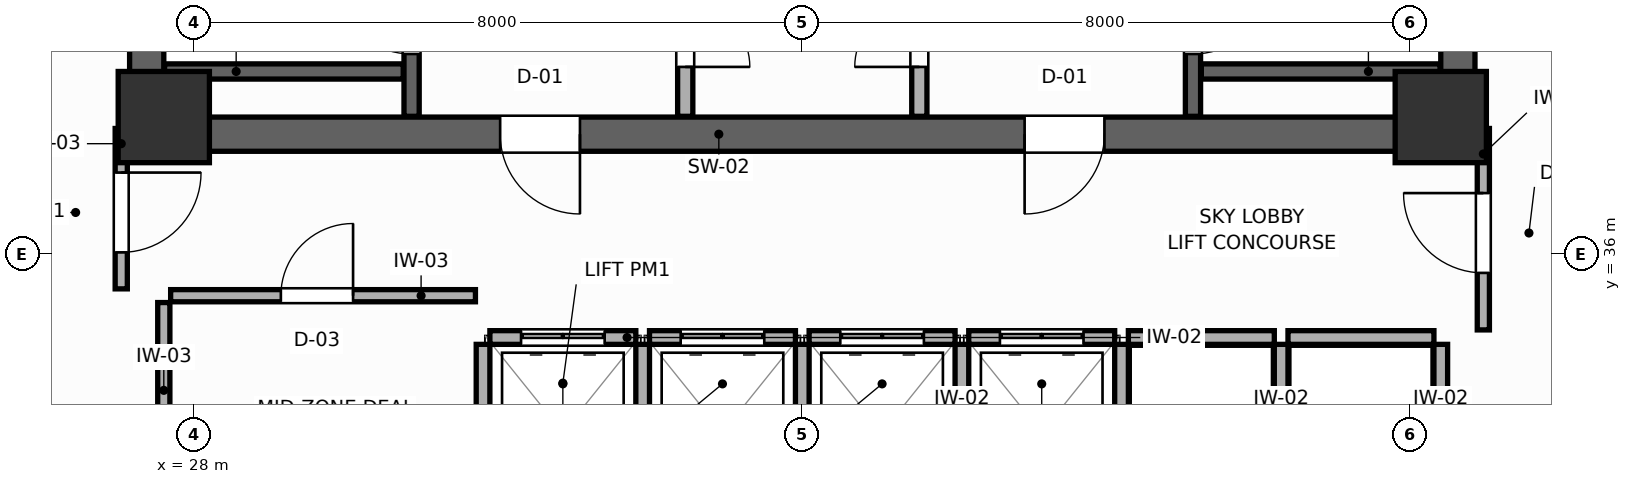
"""IFC4 building model, lengths in metres.
Left out: names, types, materials, properties, quantities, classifications, styles, units other than length and angle.
Written with IfcOpenShell. Run it as: python <this file> out.ifc"""

import sys

from ifc_helpers import new_model, si_unit, direction, frame, frame_2d, origin, origin_2d, place, context, subcontext, project, spatial, rectangle, extrude, source, transform, mapped, element, fill, save


model = new_model("IFC4")
c1 = context("Model", 3, precision=1e-05, world=origin(), true_north=direction((0.0, 1.0)))
c2 = subcontext(c1, "Body", "Model", "MODEL_VIEW")
j1 = project(units=[si_unit("LENGTHUNIT", "METRE"), si_unit("PLANEANGLEUNIT", "RADIAN")], contexts=[c1])
p1 = place(None, origin())
s1 = spatial("IfcSite", under=j1, at=p1, CompositionType="ELEMENT")
p2 = place(p1, origin())
s2 = spatial("IfcBuilding", under=s1, at=p2, CompositionType="ELEMENT")
p3 = place(p2, frame((0.0, 0.0, 168.6)))
s3 = spatial("IfcBuildingStorey", under=s2, at=p3, CompositionType="ELEMENT", Elevation=168.6)
p4 = place(p3, frame((27.15, 37.575, 0.0), z_axis=(0.0, 0.0, 1.0), x_axis=(1.0, 0.0, 0.0)))
e1 = element("IfcWall", 1, at=p4, inside=s3, PredefinedType="SHEAR", context=c2, shape_type="SweptSolid", body=[
    extrude(rectangle(XDim=17.7, YDim=0.45, at=frame_2d((8.85, 0.0))), origin(), (0.0, 0.0, 1.0), 3.6),
])
p5 = place(p4, frame((4.875, 0.0, 0.0)))
e2 = element("IfcOpeningElement", 2, at=p5, cuts=e1, PredefinedType="OPENING", context=c2, shape_type="SweptSolid", body=[
    extrude(rectangle(XDim=1.05, YDim=2.1, at=frame_2d((0.525, 1.05))), frame((0.0, 0.235, 0.0), z_axis=(0.0, -1.0, 0.0), x_axis=(1.0, 0.0, 0.0)), (0.0, 0.0, 1.0), 0.47),
])
p6 = place(p4, frame((11.775, 0.0, 0.0)))
e3 = element("IfcOpeningElement", 3, at=p6, cuts=e1, PredefinedType="OPENING", context=c2, shape_type="SweptSolid", body=[
    extrude(rectangle(XDim=1.05, YDim=2.1, at=frame_2d((0.525, 1.05))), frame((0.0, 0.235, 0.0), z_axis=(0.0, -1.0, 0.0), x_axis=(1.0, 0.0, 0.0)), (0.0, 0.0, 1.0), 0.47),
])
for number, where, z_axis, x_axis in (
    (4, (27.375, 37.8, 0.0), (0.0, 0.0, 1.0), (0.0, 1.0, 0.0)),
    (5, (44.625, 37.8, 0.0), (0.0, 0.0, 1.0), (0.0, 1.0, 0.0)),
):
    element("IfcWall", number, at=place(p3, frame(where, z_axis=z_axis, x_axis=x_axis)), inside=s3, PredefinedType="SHEAR", context=c2, shape_type="SweptSolid", body=[
        extrude(rectangle(XDim=9.0, YDim=0.45, at=frame_2d((4.5, 0.0))), origin(), (0.0, 0.0, 1.0), 3.6),
    ])
m1 = source(origin(), c2, "Body", "SweptSolid", [
    extrude(rectangle(XDim=1.2, YDim=1.2, at=origin_2d()), origin(), (0.0, 0.0, 1.0), 3.6),
])
for number, where, z_axis, x_axis in (
    (6, (27.6, 37.8, 0.0), (0.0, 0.0, 1.0), (1.0, 0.0, 0.0)),
    (7, (44.4, 37.8, 0.0), (0.0, 0.0, 1.0), (1.0, 0.0, 0.0)),
):
    element("IfcColumn", number, at=place(p3, frame(where, z_axis=z_axis, x_axis=x_axis)), inside=s3, PredefinedType="COLUMN", context=c2, shape_type="MappedRepresentation", body=[
        mapped(m1, transform((0.0, 0.0, 0.0), scale=1.0)),
    ])
p7 = place(p3, frame((30.86, 37.81, 0.0), z_axis=(0.0, 0.0, 1.0), x_axis=(0.0, 1.0, 0.0)))
e8 = element("IfcWall", 8, at=p7, inside=s3, PredefinedType="SHEAR", context=c2, shape_type="SweptSolid", body=[
    extrude(rectangle(XDim=8.98, YDim=0.2, at=frame_2d((4.49, 0.0))), origin(), (0.0, 0.0, 1.0), 3.6),
])
p8 = place(p7, frame((0.82, 0.0, 0.0)))
e9 = element("IfcOpeningElement", 9, at=p8, cuts=e8, PredefinedType="OPENING", context=c2, shape_type="SweptSolid", body=[
    extrude(rectangle(XDim=1.05, YDim=2.1, at=frame_2d((0.525, 1.05))), frame((0.0, 0.11, 0.0), z_axis=(0.0, -1.0, 0.0), x_axis=(1.0, 0.0, 0.0)), (0.0, 0.0, 1.0), 0.22),
])
p9 = place(p3, frame((27.61, 38.4, 0.0), z_axis=(0.0, 0.0, 1.0), x_axis=(1.0, 0.0, 0.0)))
e10 = element("IfcWall", 10, at=p9, inside=s3, PredefinedType="SHEAR", context=c2, shape_type="SweptSolid", body=[
    extrude(rectangle(XDim=3.14, YDim=0.2, at=frame_2d((1.57, 0.0))), origin(), (0.0, 0.0, 1.0), 3.6),
])
p10 = place(p3, frame((41.14, 37.81, 0.0), z_axis=(0.0, 0.0, 1.0), x_axis=(0.0, 1.0, 0.0)))
e11 = element("IfcWall", 11, at=p10, inside=s3, PredefinedType="SHEAR", context=c2, shape_type="SweptSolid", body=[
    extrude(rectangle(XDim=8.98, YDim=0.2, at=frame_2d((4.49, 0.0))), origin(), (0.0, 0.0, 1.0), 3.6),
])
p11 = place(p10, frame((0.82, 0.0, 0.0)))
e12 = element("IfcOpeningElement", 12, at=p11, cuts=e11, PredefinedType="OPENING", context=c2, shape_type="SweptSolid", body=[
    extrude(rectangle(XDim=1.05, YDim=2.1, at=frame_2d((0.525, 1.05))), frame((0.0, 0.11, 0.0), z_axis=(0.0, -1.0, 0.0), x_axis=(1.0, 0.0, 0.0)), (0.0, 0.0, 1.0), 0.22),
])
p12 = place(p3, frame((41.25, 38.4, 0.0), z_axis=(0.0, 0.0, 1.0), x_axis=(1.0, 0.0, 0.0)))
e13 = element("IfcWall", 13, at=p12, inside=s3, PredefinedType="SHEAR", context=c2, shape_type="SweptSolid", body=[
    extrude(rectangle(XDim=3.14, YDim=0.2, at=frame_2d((1.57, 0.0))), origin(), (0.0, 0.0, 1.0), 3.6),
])
p13 = place(p3, frame((34.46, 37.81, 0.0), z_axis=(0.0, 0.0, 1.0), x_axis=(0.0, 1.0, 0.0)))
e14 = element("IfcWall", 14, at=p13, inside=s3, PredefinedType="PARTITIONING", context=c2, shape_type="SweptSolid", body=[
    extrude(rectangle(XDim=8.98, YDim=0.2, at=frame_2d((4.49, 0.0))), origin(), (0.0, 0.0, 1.0), 3.4),
])
p14 = place(p13, frame((0.65, 0.0, 0.0)))
e15 = element("IfcOpeningElement", 15, at=p14, cuts=e14, PredefinedType="OPENING", context=c2, shape_type="SweptSolid", body=[
    extrude(rectangle(XDim=0.85, YDim=2.05, at=frame_2d((0.425, 1.025))), frame((0.0, 0.11, 0.0), z_axis=(0.0, -1.0, 0.0), x_axis=(1.0, 0.0, 0.0)), (0.0, 0.0, 1.0), 0.22),
])
p15 = place(p3, frame((37.54, 37.81, 0.0), z_axis=(0.0, 0.0, 1.0), x_axis=(0.0, 1.0, 0.0)))
e16 = element("IfcWall", 16, at=p15, inside=s3, PredefinedType="PARTITIONING", context=c2, shape_type="SweptSolid", body=[
    extrude(rectangle(XDim=8.98, YDim=0.2, at=frame_2d((4.49, 0.0))), origin(), (0.0, 0.0, 1.0), 3.4),
])
p16 = place(p15, frame((0.65, 0.0, 0.0)))
e17 = element("IfcOpeningElement", 17, at=p16, cuts=e16, PredefinedType="OPENING", context=c2, shape_type="SweptSolid", body=[
    extrude(rectangle(XDim=0.85, YDim=2.05, at=frame_2d((0.425, 1.025))), frame((0.0, 0.11, 0.0), z_axis=(0.0, -1.0, 0.0), x_axis=(1.0, 0.0, 0.0)), (0.0, 0.0, 1.0), 0.22),
])
p17 = place(p3, frame((31.89, 34.9, 0.0), z_axis=(0.0, 0.0, 1.0), x_axis=(1.0, 0.0, 0.0)))
e18 = element("IfcWall", 18, at=p17, inside=s3, PredefinedType="PARTITIONING", context=c2, shape_type="SweptSolid", body=[
    extrude(rectangle(XDim=1.92, YDim=0.18, at=frame_2d((0.96, 0.0))), origin(), (0.0, 0.0, 1.0), 3.4),
])
p18 = place(p17, frame((0.41, 0.0, 0.0)))
e19 = element("IfcOpeningElement", 19, at=p18, cuts=e18, PredefinedType="OPENING", context=c2, shape_type="SweptSolid", body=[
    extrude(rectangle(XDim=1.1, YDim=2.1, at=frame_2d((0.55, 1.05))), frame((0.0, 0.1, 0.0), z_axis=(0.0, -1.0, 0.0), x_axis=(1.0, 0.0, 0.0)), (0.0, 0.0, 1.0), 0.2),
])
p19 = place(p3, frame((31.8, 32.49, 0.0), z_axis=(0.0, 0.0, 1.0), x_axis=(0.0, 1.0, 0.0)))
e20 = element("IfcWall", 20, at=p19, inside=s3, PredefinedType="PARTITIONING", context=c2, shape_type="SweptSolid", body=[
    extrude(rectangle(XDim=2.32, YDim=0.18, at=frame_2d((1.16, 0.0))), origin(), (0.0, 0.0, 1.0), 3.4),
])
p20 = place(p3, frame((33.99, 34.9, 0.0), z_axis=(0.0, 0.0, 1.0), x_axis=(1.0, 0.0, 0.0)))
e21 = element("IfcWall", 21, at=p20, inside=s3, PredefinedType="PARTITIONING", context=c2, shape_type="SweptSolid", body=[
    extrude(rectangle(XDim=1.92, YDim=0.18, at=frame_2d((0.96, 0.0))), origin(), (0.0, 0.0, 1.0), 3.4),
])
p21 = place(p20, frame((0.41, 0.0, 0.0)))
e22 = element("IfcOpeningElement", 22, at=p21, cuts=e21, PredefinedType="OPENING", context=c2, shape_type="SweptSolid", body=[
    extrude(rectangle(XDim=1.1, YDim=2.1, at=frame_2d((0.55, 1.05))), frame((0.0, 0.1, 0.0), z_axis=(0.0, -1.0, 0.0), x_axis=(1.0, 0.0, 0.0)), (0.0, 0.0, 1.0), 0.2),
])
p22 = place(p3, frame((33.9, 32.49, 0.0), z_axis=(0.0, 0.0, 1.0), x_axis=(0.0, 1.0, 0.0)))
e23 = element("IfcWall", 23, at=p22, inside=s3, PredefinedType="PARTITIONING", context=c2, shape_type="SweptSolid", body=[
    extrude(rectangle(XDim=2.32, YDim=0.18, at=frame_2d((1.16, 0.0))), origin(), (0.0, 0.0, 1.0), 3.4),
])
p23 = place(p3, frame((36.09, 34.9, 0.0), z_axis=(0.0, 0.0, 1.0), x_axis=(1.0, 0.0, 0.0)))
e24 = element("IfcWall", 24, at=p23, inside=s3, PredefinedType="PARTITIONING", context=c2, shape_type="SweptSolid", body=[
    extrude(rectangle(XDim=1.92, YDim=0.18, at=frame_2d((0.96, 0.0))), origin(), (0.0, 0.0, 1.0), 3.4),
])
p24 = place(p23, frame((0.41, 0.0, 0.0)))
e25 = element("IfcOpeningElement", 25, at=p24, cuts=e24, PredefinedType="OPENING", context=c2, shape_type="SweptSolid", body=[
    extrude(rectangle(XDim=1.1, YDim=2.1, at=frame_2d((0.55, 1.05))), frame((0.0, 0.1, 0.0), z_axis=(0.0, -1.0, 0.0), x_axis=(1.0, 0.0, 0.0)), (0.0, 0.0, 1.0), 0.2),
])
p25 = place(p3, frame((36.0, 32.49, 0.0), z_axis=(0.0, 0.0, 1.0), x_axis=(0.0, 1.0, 0.0)))
e26 = element("IfcWall", 26, at=p25, inside=s3, PredefinedType="PARTITIONING", context=c2, shape_type="SweptSolid", body=[
    extrude(rectangle(XDim=2.32, YDim=0.18, at=frame_2d((1.16, 0.0))), origin(), (0.0, 0.0, 1.0), 3.4),
])
p26 = place(p3, frame((38.19, 34.9, 0.0), z_axis=(0.0, 0.0, 1.0), x_axis=(1.0, 0.0, 0.0)))
e27 = element("IfcWall", 27, at=p26, inside=s3, PredefinedType="PARTITIONING", context=c2, shape_type="SweptSolid", body=[
    extrude(rectangle(XDim=1.92, YDim=0.18, at=frame_2d((0.96, 0.0))), origin(), (0.0, 0.0, 1.0), 3.4),
])
p27 = place(p26, frame((0.41, 0.0, 0.0)))
e28 = element("IfcOpeningElement", 28, at=p27, cuts=e27, PredefinedType="OPENING", context=c2, shape_type="SweptSolid", body=[
    extrude(rectangle(XDim=1.1, YDim=2.1, at=frame_2d((0.55, 1.05))), frame((0.0, 0.1, 0.0), z_axis=(0.0, -1.0, 0.0), x_axis=(1.0, 0.0, 0.0)), (0.0, 0.0, 1.0), 0.2),
])
p28 = place(p3, frame((38.1, 32.49, 0.0), z_axis=(0.0, 0.0, 1.0), x_axis=(0.0, 1.0, 0.0)))
e29 = element("IfcWall", 29, at=p28, inside=s3, PredefinedType="PARTITIONING", context=c2, shape_type="SweptSolid", body=[
    extrude(rectangle(XDim=2.32, YDim=0.18, at=frame_2d((1.16, 0.0))), origin(), (0.0, 0.0, 1.0), 3.4),
])
p29 = place(p3, frame((40.29, 34.9, 0.0), z_axis=(0.0, 0.0, 1.0), x_axis=(1.0, 0.0, 0.0)))
e30 = element("IfcWall", 30, at=p29, inside=s3, PredefinedType="PARTITIONING", context=c2, shape_type="SweptSolid", body=[
    extrude(rectangle(XDim=1.92, YDim=0.18, at=frame_2d((0.96, 0.0))), origin(), (0.0, 0.0, 1.0), 3.4),
])
p30 = place(p3, frame((40.2, 32.49, 0.0), z_axis=(0.0, 0.0, 1.0), x_axis=(0.0, 1.0, 0.0)))
e31 = element("IfcWall", 31, at=p30, inside=s3, PredefinedType="PARTITIONING", context=c2, shape_type="SweptSolid", body=[
    extrude(rectangle(XDim=2.32, YDim=0.18, at=frame_2d((1.16, 0.0))), origin(), (0.0, 0.0, 1.0), 3.4),
])
p31 = place(p3, frame((42.39, 34.9, 0.0), z_axis=(0.0, 0.0, 1.0), x_axis=(1.0, 0.0, 0.0)))
e32 = element("IfcWall", 32, at=p31, inside=s3, PredefinedType="PARTITIONING", context=c2, shape_type="SweptSolid", body=[
    extrude(rectangle(XDim=1.92, YDim=0.18, at=frame_2d((0.96, 0.0))), origin(), (0.0, 0.0, 1.0), 3.4),
])
for number, where, z_axis, x_axis in (
    (33, (42.3, 32.49, 0.0), (0.0, 0.0, 1.0), (0.0, 1.0, 0.0)),
    (34, (44.4, 32.49, 0.0), (0.0, 0.0, 1.0), (0.0, 1.0, 0.0)),
):
    element("IfcWall", number, at=place(p3, frame(where, z_axis=z_axis, x_axis=x_axis)), inside=s3, PredefinedType="PARTITIONING", context=c2, shape_type="SweptSolid", body=[
        extrude(rectangle(XDim=2.32, YDim=0.18, at=frame_2d((1.16, 0.0))), origin(), (0.0, 0.0, 1.0), 3.4),
    ])
p32 = place(p3, frame((27.6, 33.05, 0.0), z_axis=(0.0, 0.0, 1.0), x_axis=(0.0, 1.0, 0.0)))
e35 = element("IfcWall", 35, at=p32, inside=s3, PredefinedType="PARTITIONING", context=c2, shape_type="SweptSolid", body=[
    extrude(rectangle(XDim=2.31, YDim=0.16, at=frame_2d((1.155, 0.0))), origin(), (0.0, 0.0, 1.0), 3.4),
])
p33 = place(p3, frame((27.69, 35.45, 0.0), z_axis=(0.0, 0.0, 1.0), x_axis=(1.0, 0.0, 0.0)))
e36 = element("IfcWall", 36, at=p33, inside=s3, PredefinedType="PARTITIONING", context=c2, shape_type="SweptSolid", body=[
    extrude(rectangle(XDim=4.01, YDim=0.16, at=frame_2d((2.005, 0.0))), origin(), (0.0, 0.0, 1.0), 3.4),
])
p34 = place(p33, frame((1.45, 0.0, 0.0)))
e37 = element("IfcOpeningElement", 37, at=p34, cuts=e36, PredefinedType="OPENING", context=c2, shape_type="SweptSolid", body=[
    extrude(rectangle(XDim=0.95, YDim=2.05, at=frame_2d((0.475, 1.025))), frame((0.0, 0.09, 0.0), z_axis=(0.0, -1.0, 0.0), x_axis=(1.0, 0.0, 0.0)), (0.0, 0.0, 1.0), 0.18),
])
p35 = place(p3, frame((27.04, 35.54, 0.0), z_axis=(0.0, 0.0, 1.0), x_axis=(0.0, 1.0, 0.0)))
e38 = element("IfcWall", 38, at=p35, inside=s3, PredefinedType="PARTITIONING", context=c2, shape_type="SweptSolid", body=[
    extrude(rectangle(XDim=2.11, YDim=0.16, at=frame_2d((1.055, 0.0))), origin(), (0.0, 0.0, 1.0), 3.4),
])
p36 = place(p35, frame((0.48, 0.0, 0.0)))
e39 = element("IfcOpeningElement", 39, at=p36, cuts=e38, PredefinedType="OPENING", context=c2, shape_type="SweptSolid", body=[
    extrude(rectangle(XDim=1.05, YDim=2.1, at=frame_2d((0.525, 1.05))), frame((0.0, 0.09, 0.0), z_axis=(0.0, -1.0, 0.0), x_axis=(1.0, 0.0, 0.0)), (0.0, 0.0, 1.0), 0.18),
])
p37 = place(p3, frame((44.96, 35.0, 0.0), z_axis=(0.0, 0.0, 1.0), x_axis=(0.0, 1.0, 0.0)))
e40 = element("IfcWall", 40, at=p37, inside=s3, PredefinedType="PARTITIONING", context=c2, shape_type="SweptSolid", body=[
    extrude(rectangle(XDim=2.65, YDim=0.16, at=frame_2d((1.325, 0.0))), origin(), (0.0, 0.0, 1.0), 3.4),
])
p38 = place(p37, frame((0.75, 0.0, 0.0)))
e41 = element("IfcOpeningElement", 41, at=p38, cuts=e40, PredefinedType="OPENING", context=c2, shape_type="SweptSolid", body=[
    extrude(rectangle(XDim=1.05, YDim=2.1, at=frame_2d((0.525, 1.05))), frame((0.0, 0.09, 0.0), z_axis=(0.0, -1.0, 0.0), x_axis=(1.0, 0.0, 0.0)), (0.0, 0.0, 1.0), 0.18),
])
p39 = place(p8, origin())
e42 = element("IfcDoor", 42, at=p39, inside=s3, OperationType="SINGLE_SWING_RIGHT", PredefinedType="DOOR", context=c2, shape_type="SweptSolid", body=[
    extrude(rectangle(XDim=1.05, YDim=2.1, at=frame_2d((0.525, 1.05))), frame((0.0, 0.025, 0.0), z_axis=(0.0, -1.0, 0.0), x_axis=(1.0, 0.0, 0.0)), (0.0, 0.0, 1.0), 0.05),
])
fill(e9, e42)
p40 = place(p11, frame((1.05, 0.0, 0.0), z_axis=(0.0, 0.0, 1.0), x_axis=(-1.0, 0.0, 0.0)))
e43 = element("IfcDoor", 43, at=p40, inside=s3, OperationType="SINGLE_SWING_LEFT", PredefinedType="DOOR", context=c2, shape_type="SweptSolid", body=[
    extrude(rectangle(XDim=1.05, YDim=2.1, at=frame_2d((0.525, 1.05))), frame((0.0, 0.025, 0.0), z_axis=(0.0, -1.0, 0.0), x_axis=(1.0, 0.0, 0.0)), (0.0, 0.0, 1.0), 0.05),
])
fill(e12, e43)
p41 = place(p14, frame((0.85, 0.0, 0.0), z_axis=(0.0, 0.0, 1.0), x_axis=(-1.0, 0.0, 0.0)))
e44 = element("IfcDoor", 44, at=p41, inside=s3, OperationType="SINGLE_SWING_RIGHT", PredefinedType="DOOR", context=c2, shape_type="SweptSolid", body=[
    extrude(rectangle(XDim=0.85, YDim=2.05, at=frame_2d((0.425, 1.025))), frame((0.0, 0.025, 0.0), z_axis=(0.0, -1.0, 0.0), x_axis=(1.0, 0.0, 0.0)), (0.0, 0.0, 1.0), 0.05),
])
fill(e15, e44)
p42 = place(p16, origin())
e45 = element("IfcDoor", 45, at=p42, inside=s3, OperationType="SINGLE_SWING_LEFT", PredefinedType="DOOR", context=c2, shape_type="SweptSolid", body=[
    extrude(rectangle(XDim=0.85, YDim=2.05, at=frame_2d((0.425, 1.025))), frame((0.0, 0.025, 0.0), z_axis=(0.0, -1.0, 0.0), x_axis=(1.0, 0.0, 0.0)), (0.0, 0.0, 1.0), 0.05),
])
fill(e17, e45)
p43 = place(p18, origin())
e46 = element("IfcDoor", 46, at=p43, inside=s3, OperationType="DOUBLE_DOOR_SLIDING", PredefinedType="DOOR", context=c2, shape_type="SweptSolid", body=[
    extrude(rectangle(XDim=1.1, YDim=2.1, at=frame_2d((0.55, 1.05))), frame((0.0, 0.025, 0.0), z_axis=(0.0, -1.0, 0.0), x_axis=(1.0, 0.0, 0.0)), (0.0, 0.0, 1.0), 0.05),
])
fill(e19, e46)
p44 = place(p21, origin())
e47 = element("IfcDoor", 47, at=p44, inside=s3, OperationType="DOUBLE_DOOR_SLIDING", PredefinedType="DOOR", context=c2, shape_type="SweptSolid", body=[
    extrude(rectangle(XDim=1.1, YDim=2.1, at=frame_2d((0.55, 1.05))), frame((0.0, 0.025, 0.0), z_axis=(0.0, -1.0, 0.0), x_axis=(1.0, 0.0, 0.0)), (0.0, 0.0, 1.0), 0.05),
])
fill(e22, e47)
p45 = place(p24, origin())
e48 = element("IfcDoor", 48, at=p45, inside=s3, OperationType="DOUBLE_DOOR_SLIDING", PredefinedType="DOOR", context=c2, shape_type="SweptSolid", body=[
    extrude(rectangle(XDim=1.1, YDim=2.1, at=frame_2d((0.55, 1.05))), frame((0.0, 0.025, 0.0), z_axis=(0.0, -1.0, 0.0), x_axis=(1.0, 0.0, 0.0)), (0.0, 0.0, 1.0), 0.05),
])
fill(e25, e48)
p46 = place(p27, origin())
e49 = element("IfcDoor", 49, at=p46, inside=s3, OperationType="DOUBLE_DOOR_SLIDING", PredefinedType="DOOR", context=c2, shape_type="SweptSolid", body=[
    extrude(rectangle(XDim=1.1, YDim=2.1, at=frame_2d((0.55, 1.05))), frame((0.0, 0.025, 0.0), z_axis=(0.0, -1.0, 0.0), x_axis=(1.0, 0.0, 0.0)), (0.0, 0.0, 1.0), 0.05),
])
fill(e28, e49)
p47 = place(p34, origin())
e50 = element("IfcDoor", 50, at=p47, inside=s3, OperationType="SINGLE_SWING_RIGHT", PredefinedType="DOOR", context=c2, shape_type="SweptSolid", body=[
    extrude(rectangle(XDim=0.95, YDim=2.05, at=frame_2d((0.475, 1.025))), frame((0.0, 0.025, 0.0), z_axis=(0.0, -1.0, 0.0), x_axis=(1.0, 0.0, 0.0)), (0.0, 0.0, 1.0), 0.05),
])
fill(e37, e50)
p48 = place(p36, frame((1.05, 0.0, 0.0), z_axis=(0.0, 0.0, 1.0), x_axis=(-1.0, 0.0, 0.0)))
e51 = element("IfcDoor", 51, at=p48, inside=s3, OperationType="SINGLE_SWING_LEFT", PredefinedType="DOOR", context=c2, shape_type="SweptSolid", body=[
    extrude(rectangle(XDim=1.05, YDim=2.1, at=frame_2d((0.525, 1.05))), frame((0.0, 0.025, 0.0), z_axis=(0.0, -1.0, 0.0), x_axis=(1.0, 0.0, 0.0)), (0.0, 0.0, 1.0), 0.05),
])
fill(e39, e51)
p49 = place(p38, origin())
e52 = element("IfcDoor", 52, at=p49, inside=s3, OperationType="SINGLE_SWING_RIGHT", PredefinedType="DOOR", context=c2, shape_type="SweptSolid", body=[
    extrude(rectangle(XDim=1.05, YDim=2.1, at=frame_2d((0.525, 1.05))), frame((0.0, 0.025, 0.0), z_axis=(0.0, -1.0, 0.0), x_axis=(1.0, 0.0, 0.0)), (0.0, 0.0, 1.0), 0.05),
])
fill(e41, e52)
p50 = place(p5, frame((1.05, 0.0, 0.0), z_axis=(0.0, 0.0, 1.0), x_axis=(-1.0, 0.0, 0.0)))
e53 = element("IfcDoor", 53, at=p50, inside=s3, OperationType="SINGLE_SWING_LEFT", PredefinedType="DOOR", context=c2, shape_type="SweptSolid", body=[
    extrude(rectangle(XDim=1.05, YDim=2.1, at=frame_2d((0.525, 1.05))), frame((0.0, 0.025, 0.0), z_axis=(0.0, -1.0, 0.0), x_axis=(1.0, 0.0, 0.0)), (0.0, 0.0, 1.0), 0.05),
])
fill(e2, e53)
p51 = place(p6, frame((1.05, 0.0, 0.0), z_axis=(0.0, 0.0, 1.0), x_axis=(-1.0, 0.0, 0.0)))
e54 = element("IfcDoor", 54, at=p51, inside=s3, OperationType="SINGLE_SWING_RIGHT", PredefinedType="DOOR", context=c2, shape_type="SweptSolid", body=[
    extrude(rectangle(XDim=1.05, YDim=2.1, at=frame_2d((0.525, 1.05))), frame((0.0, 0.025, 0.0), z_axis=(0.0, -1.0, 0.0), x_axis=(1.0, 0.0, 0.0)), (0.0, 0.0, 1.0), 0.05),
])
fill(e3, e54)
save(model, sys.argv[1])
